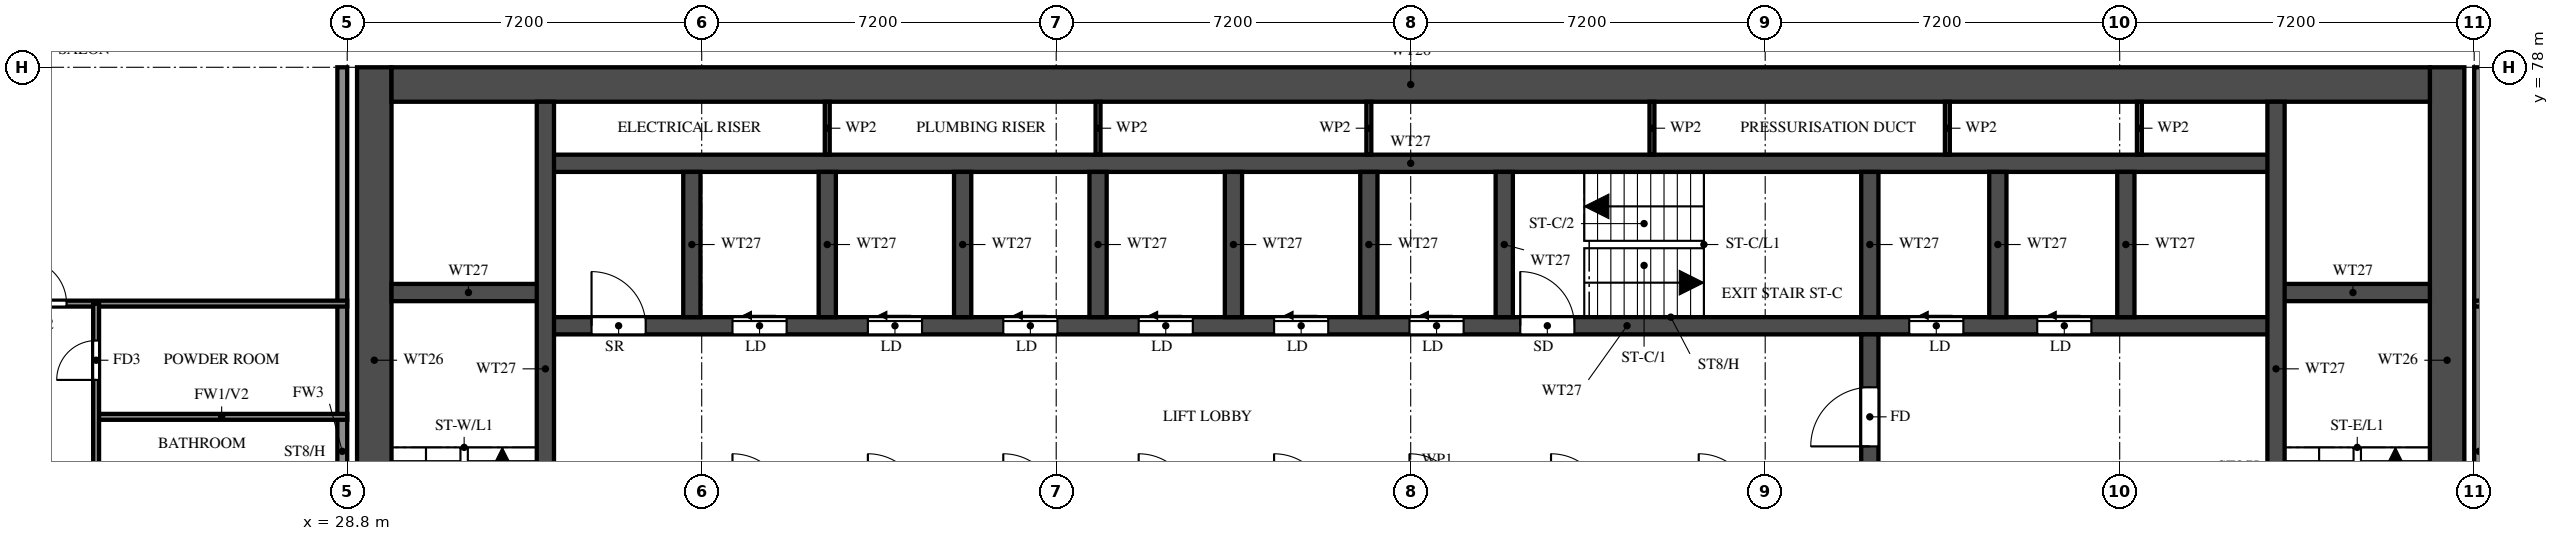
"""IFC4 building model, lengths in metres.
Left out: names, types, materials, properties, quantities, classifications, styles, units other than length and angle.
Written with IfcOpenShell. Run it as: python <this file> out.ifc"""

import sys

from ifc_helpers import new_model, si_unit, direction, frame, frame_2d, origin, place, context, subcontext, project, spatial, rectangle, extrude, element, fill, save


model = new_model("IFC4")
c1 = context("Model", 3, precision=1e-05, world=origin(), true_north=direction((0.0, 1.0)))
c2 = subcontext(c1, "Body", "Model", "MODEL_VIEW")
j1 = project(units=[si_unit("LENGTHUNIT", "METRE"), si_unit("PLANEANGLEUNIT", "RADIAN")], contexts=[c1])
p1 = place(None, origin())
s1 = spatial("IfcSite", under=j1, at=p1, CompositionType="ELEMENT")
p2 = place(p1, origin())
s2 = spatial("IfcBuilding", under=s1, at=p2, CompositionType="ELEMENT")
p3 = place(p2, frame((0.0, 0.0, 160.5)))
s3 = spatial("IfcBuildingStorey", under=s2, at=p3, CompositionType="ELEMENT", Elevation=160.5)
for number, where, z_axis, x_axis in (
    (1, (29.35, 66.1, 0.0), (0.0, 0.0, 1.0), (0.0, 1.0, 0.0)),
    (2, (71.45, 66.1, 0.0), (0.0, 0.0, 1.0), (0.0, 1.0, 0.0)),
):
    element("IfcWall", number, at=place(p3, frame(where, z_axis=z_axis, x_axis=x_axis)), inside=s3, PredefinedType="SHEAR", context=c2, shape_type="SweptSolid", body=[
        extrude(rectangle(XDim=11.9, YDim=0.7, at=frame_2d((5.95, 0.0))), origin(), (0.0, 0.0, 1.0), 3.2),
    ])
p4 = place(p3, frame((29.7, 77.65, 0.0), z_axis=(0.0, 0.0, 1.0), x_axis=(1.0, 0.0, 0.0)))
e3 = element("IfcWall", 3, at=p4, inside=s3, PredefinedType="SHEAR", context=c2, shape_type="SweptSolid", body=[
    extrude(rectangle(XDim=41.4, YDim=0.7, at=frame_2d((20.7, 0.0))), origin(), (0.0, 0.0, 1.0), 3.2),
])
p5 = place(p3, frame((32.825, 72.75, 0.0), z_axis=(0.0, 0.0, 1.0), x_axis=(1.0, 0.0, 0.0)))
e4 = element("IfcWall", 4, at=p5, inside=s3, PredefinedType="SHEAR", context=c2, shape_type="SweptSolid", body=[
    extrude(rectangle(XDim=35.15, YDim=0.35, at=frame_2d((17.575, 0.0))), origin(), (0.0, 0.0, 1.0), 3.2),
])
p6 = place(p5, frame((19.8, 0.0, 0.0)))
e5 = element("IfcOpeningElement", 5, at=p6, cuts=e4, PredefinedType="OPENING", context=c2, shape_type="SweptSolid", body=[
    extrude(rectangle(XDim=1.1, YDim=2.1, at=frame_2d((0.55, 1.05))), frame((0.0, 0.185, 0.0), z_axis=(0.0, -1.0, 0.0), x_axis=(1.0, 0.0, 0.0)), (0.0, 0.0, 1.0), 0.37),
])
p7 = place(p5, frame((27.7, 0.0, 0.0)))
e6 = element("IfcOpeningElement", 6, at=p7, cuts=e4, PredefinedType="OPENING", context=c2, shape_type="SweptSolid", body=[
    extrude(rectangle(XDim=1.1, YDim=2.1, at=frame_2d((0.55, 1.05))), frame((0.0, 0.185, 0.0), z_axis=(0.0, -1.0, 0.0), x_axis=(1.0, 0.0, 0.0)), (0.0, 0.0, 1.0), 0.37),
])
p8 = place(p5, frame((30.3, 0.0, 0.0)))
e7 = element("IfcOpeningElement", 7, at=p8, cuts=e4, PredefinedType="OPENING", context=c2, shape_type="SweptSolid", body=[
    extrude(rectangle(XDim=1.1, YDim=2.1, at=frame_2d((0.55, 1.05))), frame((0.0, 0.185, 0.0), z_axis=(0.0, -1.0, 0.0), x_axis=(1.0, 0.0, 0.0)), (0.0, 0.0, 1.0), 0.37),
])
p9 = place(p5, frame((3.8, 0.0, 0.0)))
e8 = element("IfcOpeningElement", 8, at=p9, cuts=e4, PredefinedType="OPENING", context=c2, shape_type="SweptSolid", body=[
    extrude(rectangle(XDim=1.1, YDim=2.1, at=frame_2d((0.55, 1.05))), frame((0.0, 0.185, 0.0), z_axis=(0.0, -1.0, 0.0), x_axis=(1.0, 0.0, 0.0)), (0.0, 0.0, 1.0), 0.37),
])
p10 = place(p5, frame((6.55, 0.0, 0.0)))
e9 = element("IfcOpeningElement", 9, at=p10, cuts=e4, PredefinedType="OPENING", context=c2, shape_type="SweptSolid", body=[
    extrude(rectangle(XDim=1.1, YDim=2.1, at=frame_2d((0.55, 1.05))), frame((0.0, 0.185, 0.0), z_axis=(0.0, -1.0, 0.0), x_axis=(1.0, 0.0, 0.0)), (0.0, 0.0, 1.0), 0.37),
])
p11 = place(p5, frame((9.3, 0.0, 0.0)))
e10 = element("IfcOpeningElement", 10, at=p11, cuts=e4, PredefinedType="OPENING", context=c2, shape_type="SweptSolid", body=[
    extrude(rectangle(XDim=1.1, YDim=2.1, at=frame_2d((0.55, 1.05))), frame((0.0, 0.185, 0.0), z_axis=(0.0, -1.0, 0.0), x_axis=(1.0, 0.0, 0.0)), (0.0, 0.0, 1.0), 0.37),
])
p12 = place(p5, frame((12.05, 0.0, 0.0)))
e11 = element("IfcOpeningElement", 11, at=p12, cuts=e4, PredefinedType="OPENING", context=c2, shape_type="SweptSolid", body=[
    extrude(rectangle(XDim=1.1, YDim=2.1, at=frame_2d((0.55, 1.05))), frame((0.0, 0.185, 0.0), z_axis=(0.0, -1.0, 0.0), x_axis=(1.0, 0.0, 0.0)), (0.0, 0.0, 1.0), 0.37),
])
p13 = place(p5, frame((14.8, 0.0, 0.0)))
e12 = element("IfcOpeningElement", 12, at=p13, cuts=e4, PredefinedType="OPENING", context=c2, shape_type="SweptSolid", body=[
    extrude(rectangle(XDim=1.1, YDim=2.1, at=frame_2d((0.55, 1.05))), frame((0.0, 0.185, 0.0), z_axis=(0.0, -1.0, 0.0), x_axis=(1.0, 0.0, 0.0)), (0.0, 0.0, 1.0), 0.37),
])
p14 = place(p5, frame((17.55, 0.0, 0.0)))
e13 = element("IfcOpeningElement", 13, at=p14, cuts=e4, PredefinedType="OPENING", context=c2, shape_type="SweptSolid", body=[
    extrude(rectangle(XDim=1.1, YDim=2.1, at=frame_2d((0.55, 1.05))), frame((0.0, 0.185, 0.0), z_axis=(0.0, -1.0, 0.0), x_axis=(1.0, 0.0, 0.0)), (0.0, 0.0, 1.0), 0.37),
])
p15 = place(p5, frame((0.938, 0.0, 0.0)))
e14 = element("IfcOpeningElement", 14, at=p15, cuts=e4, PredefinedType="OPENING", context=c2, shape_type="SweptSolid", body=[
    extrude(rectangle(XDim=1.1, YDim=2.1, at=frame_2d((0.55, 1.05))), frame((0.0, 0.185, 0.0), z_axis=(0.0, -1.0, 0.0), x_axis=(1.0, 0.0, 0.0)), (0.0, 0.0, 1.0), 0.37),
])
p16 = place(p3, frame((32.825, 76.05, 0.0), z_axis=(0.0, 0.0, 1.0), x_axis=(1.0, 0.0, 0.0)))
e15 = element("IfcWall", 15, at=p16, inside=s3, PredefinedType="SHEAR", context=c2, shape_type="SweptSolid", body=[
    extrude(rectangle(XDim=35.15, YDim=0.35, at=frame_2d((17.575, 0.0))), origin(), (0.0, 0.0, 1.0), 3.2),
])
for number, where, z_axis, x_axis in (
    (16, (29.7, 73.425, 0.0), (0.0, 0.0, 1.0), (1.0, 0.0, 0.0)),
    (17, (67.975, 73.425, 0.0), (0.0, 0.0, 1.0), (1.0, 0.0, 0.0)),
):
    element("IfcWall", number, at=place(p3, frame(where, z_axis=z_axis, x_axis=x_axis)), inside=s3, PredefinedType="SHEAR", context=c2, shape_type="SweptSolid", body=[
        extrude(rectangle(XDim=3.125, YDim=0.35, at=frame_2d((1.562, 0.0))), origin(), (0.0, 0.0, 1.0), 3.2),
    ])
p17 = place(p3, frame((32.825, 66.45, 0.0), z_axis=(0.0, 0.0, 1.0), x_axis=(0.0, 1.0, 0.0)))
e18 = element("IfcWall", 18, at=p17, inside=s3, PredefinedType="SHEAR", context=c2, shape_type="SweptSolid", body=[
    extrude(rectangle(XDim=10.85, YDim=0.35, at=frame_2d((5.425, 0.0))), origin(), (0.0, 0.0, 1.0), 3.2),
])
p18 = place(p3, frame((67.975, 66.45, 0.0), z_axis=(0.0, 0.0, 1.0), x_axis=(0.0, 1.0, 0.0)))
e19 = element("IfcWall", 19, at=p18, inside=s3, PredefinedType="SHEAR", context=c2, shape_type="SweptSolid", body=[
    extrude(rectangle(XDim=10.85, YDim=0.35, at=frame_2d((5.425, 0.0))), origin(), (0.0, 0.0, 1.0), 3.2),
])
p19 = place(p18, frame((0.15, 0.0, 0.0)))
e20 = element("IfcOpeningElement", 20, at=p19, cuts=e19, PredefinedType="OPENING", context=c2, shape_type="SweptSolid", body=[
    extrude(rectangle(XDim=1.1, YDim=2.1, at=frame_2d((0.55, 1.05))), frame((0.0, 0.185, 0.0), z_axis=(0.0, -1.0, 0.0), x_axis=(1.0, 0.0, 0.0)), (0.0, 0.0, 1.0), 0.37),
])
p20 = place(p3, frame((59.725, 66.45, 0.0), z_axis=(0.0, 0.0, 1.0), x_axis=(0.0, 1.0, 0.0)))
e21 = element("IfcWall", 21, at=p20, inside=s3, PredefinedType="SHEAR", context=c2, shape_type="SweptSolid", body=[
    extrude(rectangle(XDim=6.125, YDim=0.35, at=frame_2d((3.062, 0.0))), origin(), (0.0, 0.0, 1.0), 3.2),
])
p21 = place(p20, frame((3.85, 0.0, 0.0)))
e22 = element("IfcOpeningElement", 22, at=p21, cuts=e21, PredefinedType="OPENING", context=c2, shape_type="SweptSolid", body=[
    extrude(rectangle(XDim=1.2, YDim=2.1, at=frame_2d((0.6, 1.05))), frame((0.0, 0.185, 0.0), z_axis=(0.0, -1.0, 0.0), x_axis=(1.0, 0.0, 0.0)), (0.0, 0.0, 1.0), 0.37),
])
for number, where, z_axis, x_axis in (
    (23, (59.725, 72.925, 0.0), (0.0, 0.0, 1.0), (0.0, 1.0, 0.0)),
    (24, (35.8, 72.925, 0.0), (0.0, 0.0, 1.0), (0.0, 1.0, 0.0)),
    (25, (38.55, 72.925, 0.0), (0.0, 0.0, 1.0), (0.0, 1.0, 0.0)),
    (26, (41.3, 72.925, 0.0), (0.0, 0.0, 1.0), (0.0, 1.0, 0.0)),
    (27, (44.05, 72.925, 0.0), (0.0, 0.0, 1.0), (0.0, 1.0, 0.0)),
    (28, (46.8, 72.925, 0.0), (0.0, 0.0, 1.0), (0.0, 1.0, 0.0)),
    (29, (49.55, 72.925, 0.0), (0.0, 0.0, 1.0), (0.0, 1.0, 0.0)),
    (30, (52.3, 72.925, 0.0), (0.0, 0.0, 1.0), (0.0, 1.0, 0.0)),
    (31, (62.325, 72.925, 0.0), (0.0, 0.0, 1.0), (0.0, 1.0, 0.0)),
    (32, (64.925, 72.925, 0.0), (0.0, 0.0, 1.0), (0.0, 1.0, 0.0)),
):
    element("IfcWall", number, at=place(p3, frame(where, z_axis=z_axis, x_axis=x_axis)), inside=s3, PredefinedType="SHEAR", context=c2, shape_type="SweptSolid", body=[
        extrude(rectangle(XDim=2.95, YDim=0.35, at=frame_2d((1.475, 0.0))), origin(), (0.0, 0.0, 1.0), 3.2),
    ])
for number, where, z_axis, x_axis in (
    (33, (38.55, 76.225, 0.0), (0.0, 0.0, 1.0), (0.0, 1.0, 0.0)),
    (34, (44.05, 76.225, 0.0), (0.0, 0.0, 1.0), (0.0, 1.0, 0.0)),
    (35, (49.55, 76.225, 0.0), (0.0, 0.0, 1.0), (0.0, 1.0, 0.0)),
    (36, (55.3, 76.225, 0.0), (0.0, 0.0, 1.0), (0.0, 1.0, 0.0)),
    (37, (61.3, 76.225, 0.0), (0.0, 0.0, 1.0), (0.0, 1.0, 0.0)),
    (38, (65.2, 76.225, 0.0), (0.0, 0.0, 1.0), (0.0, 1.0, 0.0)),
):
    element("IfcWall", number, at=place(p3, frame(where, z_axis=z_axis, x_axis=x_axis)), inside=s3, PredefinedType="PARTITIONING", context=c2, shape_type="SweptSolid", body=[
        extrude(rectangle(XDim=1.075, YDim=0.1, at=frame_2d((0.538, 0.0))), origin(), (0.0, 0.0, 1.0), 3.2),
    ])
for number, where, z_axis, x_axis in (
    (39, (28.7, 62.4, 0.0), (0.0, 0.0, 1.0), (0.0, 1.0, 0.0)),
    (40, (72.1, 62.4, 0.0), (0.0, 0.0, 1.0), (0.0, 1.0, 0.0)),
):
    element("IfcWall", number, at=place(p3, frame(where, z_axis=z_axis, x_axis=x_axis)), inside=s3, PredefinedType="SOLIDWALL", context=c2, shape_type="SweptSolid", body=[
        extrude(rectangle(XDim=15.6, YDim=0.2, at=frame_2d((7.8, 0.0))), origin(), (0.0, 0.0, 1.0), 3.2),
    ])
p22 = place(p3, frame((23.7, 70.9, 0.0), z_axis=(0.0, 0.0, 1.0), x_axis=(1.0, 0.0, 0.0)))
e41 = element("IfcWall", 41, at=p22, inside=s3, PredefinedType="PARTITIONING", context=c2, shape_type="SweptSolid", body=[
    extrude(rectangle(XDim=5.1, YDim=0.12, at=frame_2d((2.55, 0.0))), origin(), (0.0, 0.0, 1.0), 3.2),
])
p23 = place(p3, frame((14.525, 73.2, 0.0), z_axis=(0.0, 0.0, 1.0), x_axis=(1.0, 0.0, 0.0)))
e42 = element("IfcWall", 42, at=p23, inside=s3, PredefinedType="PARTITIONING", context=c2, shape_type="SweptSolid", body=[
    extrude(rectangle(XDim=14.275, YDim=0.12, at=frame_2d((7.138, 0.0))), origin(), (0.0, 0.0, 1.0), 2.3),
])
p24 = place(p23, frame((7.675, 0.0, 0.0)))
e43 = element("IfcOpeningElement", 43, at=p24, cuts=e42, PredefinedType="OPENING", context=c2, shape_type="SweptSolid", body=[
    extrude(rectangle(XDim=0.9, YDim=2.1, at=frame_2d((0.45, 1.05))), frame((0.0, 0.07, 0.0), z_axis=(0.0, -1.0, 0.0), x_axis=(1.0, 0.0, 0.0)), (0.0, 0.0, 1.0), 0.14),
])
p25 = place(p3, frame((72.0, 73.2, 0.0), z_axis=(0.0, 0.0, 1.0), x_axis=(1.0, 0.0, 0.0)))
e44 = element("IfcWall", 44, at=p25, inside=s3, PredefinedType="PARTITIONING", context=c2, shape_type="SweptSolid", body=[
    extrude(rectangle(XDim=14.275, YDim=0.12, at=frame_2d((7.137, 0.0))), origin(), (0.0, 0.0, 1.0), 2.3),
])
p26 = place(p25, frame((5.7, 0.0, 0.0)))
e45 = element("IfcOpeningElement", 45, at=p26, cuts=e44, PredefinedType="OPENING", context=c2, shape_type="SweptSolid", body=[
    extrude(rectangle(XDim=0.9, YDim=2.1, at=frame_2d((0.45, 1.05))), frame((0.0, 0.07, 0.0), z_axis=(0.0, -1.0, 0.0), x_axis=(1.0, 0.0, 0.0)), (0.0, 0.0, 1.0), 0.14),
])
p27 = place(p3, frame((23.7, 61.2, 0.0), z_axis=(0.0, 0.0, 1.0), x_axis=(0.0, 1.0, 0.0)))
e46 = element("IfcWall", 46, at=p27, inside=s3, PredefinedType="PARTITIONING", context=c2, shape_type="SweptSolid", body=[
    extrude(rectangle(XDim=12.0, YDim=0.12, at=frame_2d((6.0, 0.0))), origin(), (0.0, 0.0, 1.0), 3.2),
])
p28 = place(p27, frame((4.2, 0.0, 0.0)))
e47 = element("IfcOpeningElement", 47, at=p28, cuts=e46, PredefinedType="OPENING", context=c2, shape_type="SweptSolid", body=[
    extrude(rectangle(XDim=0.9, YDim=2.1, at=frame_2d((0.45, 1.05))), frame((0.0, 0.07, 0.0), z_axis=(0.0, -1.0, 0.0), x_axis=(1.0, 0.0, 0.0)), (0.0, 0.0, 1.0), 0.14),
])
p29 = place(p27, frame((7.975, 0.0, 0.0)))
e48 = element("IfcOpeningElement", 48, at=p29, cuts=e46, PredefinedType="OPENING", context=c2, shape_type="SweptSolid", body=[
    extrude(rectangle(XDim=0.8, YDim=2.1, at=frame_2d((0.4, 1.05))), frame((0.0, 0.07, 0.0), z_axis=(0.0, -1.0, 0.0), x_axis=(1.0, 0.0, 0.0)), (0.0, 0.0, 1.0), 0.14),
])
p30 = place(p27, frame((10.45, 0.0, 0.0)))
e49 = element("IfcOpeningElement", 49, at=p30, cuts=e46, PredefinedType="OPENING", context=c2, shape_type="SweptSolid", body=[
    extrude(rectangle(XDim=0.8, YDim=2.1, at=frame_2d((0.4, 1.05))), frame((0.0, 0.07, 0.0), z_axis=(0.0, -1.0, 0.0), x_axis=(1.0, 0.0, 0.0)), (0.0, 0.0, 1.0), 0.14),
])
p31 = place(p6, origin())
e50 = element("IfcDoor", 50, at=p31, inside=s3, OperationType="SINGLE_SWING_LEFT", PredefinedType="DOOR", context=c2, shape_type="SweptSolid", body=[
    extrude(rectangle(XDim=1.1, YDim=2.1, at=frame_2d((0.55, 1.05))), frame((0.0, 0.025, 0.0), z_axis=(0.0, -1.0, 0.0), x_axis=(1.0, 0.0, 0.0)), (0.0, 0.0, 1.0), 0.05),
])
fill(e5, e50)
p32 = place(p21, origin())
e51 = element("IfcDoor", 51, at=p32, inside=s3, OperationType="SINGLE_SWING_LEFT", PredefinedType="DOOR", context=c2, shape_type="SweptSolid", body=[
    extrude(rectangle(XDim=1.2, YDim=2.1, at=frame_2d((0.6, 1.05))), frame((0.0, 0.025, 0.0), z_axis=(0.0, -1.0, 0.0), x_axis=(1.0, 0.0, 0.0)), (0.0, 0.0, 1.0), 0.05),
])
fill(e22, e51)
p33 = place(p7, origin())
e52 = element("IfcDoor", 52, at=p33, inside=s3, OperationType="SLIDING_TO_LEFT", PredefinedType="DOOR", context=c2, shape_type="SweptSolid", body=[
    extrude(rectangle(XDim=1.1, YDim=2.1, at=frame_2d((0.55, 1.05))), frame((0.0, 0.025, 0.0), z_axis=(0.0, -1.0, 0.0), x_axis=(1.0, 0.0, 0.0)), (0.0, 0.0, 1.0), 0.05),
])
fill(e6, e52)
p34 = place(p8, origin())
e53 = element("IfcDoor", 53, at=p34, inside=s3, OperationType="SLIDING_TO_LEFT", PredefinedType="DOOR", context=c2, shape_type="SweptSolid", body=[
    extrude(rectangle(XDim=1.1, YDim=2.1, at=frame_2d((0.55, 1.05))), frame((0.0, 0.025, 0.0), z_axis=(0.0, -1.0, 0.0), x_axis=(1.0, 0.0, 0.0)), (0.0, 0.0, 1.0), 0.05),
])
fill(e7, e53)
p35 = place(p9, origin())
e54 = element("IfcDoor", 54, at=p35, inside=s3, OperationType="SLIDING_TO_LEFT", PredefinedType="DOOR", context=c2, shape_type="SweptSolid", body=[
    extrude(rectangle(XDim=1.1, YDim=2.1, at=frame_2d((0.55, 1.05))), frame((0.0, 0.025, 0.0), z_axis=(0.0, -1.0, 0.0), x_axis=(1.0, 0.0, 0.0)), (0.0, 0.0, 1.0), 0.05),
])
fill(e8, e54)
p36 = place(p10, origin())
e55 = element("IfcDoor", 55, at=p36, inside=s3, OperationType="SLIDING_TO_LEFT", PredefinedType="DOOR", context=c2, shape_type="SweptSolid", body=[
    extrude(rectangle(XDim=1.1, YDim=2.1, at=frame_2d((0.55, 1.05))), frame((0.0, 0.025, 0.0), z_axis=(0.0, -1.0, 0.0), x_axis=(1.0, 0.0, 0.0)), (0.0, 0.0, 1.0), 0.05),
])
fill(e9, e55)
p37 = place(p11, origin())
e56 = element("IfcDoor", 56, at=p37, inside=s3, OperationType="SLIDING_TO_LEFT", PredefinedType="DOOR", context=c2, shape_type="SweptSolid", body=[
    extrude(rectangle(XDim=1.1, YDim=2.1, at=frame_2d((0.55, 1.05))), frame((0.0, 0.025, 0.0), z_axis=(0.0, -1.0, 0.0), x_axis=(1.0, 0.0, 0.0)), (0.0, 0.0, 1.0), 0.05),
])
fill(e10, e56)
p38 = place(p12, origin())
e57 = element("IfcDoor", 57, at=p38, inside=s3, OperationType="SLIDING_TO_LEFT", PredefinedType="DOOR", context=c2, shape_type="SweptSolid", body=[
    extrude(rectangle(XDim=1.1, YDim=2.1, at=frame_2d((0.55, 1.05))), frame((0.0, 0.025, 0.0), z_axis=(0.0, -1.0, 0.0), x_axis=(1.0, 0.0, 0.0)), (0.0, 0.0, 1.0), 0.05),
])
fill(e11, e57)
p39 = place(p13, origin())
e58 = element("IfcDoor", 58, at=p39, inside=s3, OperationType="SLIDING_TO_LEFT", PredefinedType="DOOR", context=c2, shape_type="SweptSolid", body=[
    extrude(rectangle(XDim=1.1, YDim=2.1, at=frame_2d((0.55, 1.05))), frame((0.0, 0.025, 0.0), z_axis=(0.0, -1.0, 0.0), x_axis=(1.0, 0.0, 0.0)), (0.0, 0.0, 1.0), 0.05),
])
fill(e12, e58)
p40 = place(p14, origin())
e59 = element("IfcDoor", 59, at=p40, inside=s3, OperationType="SLIDING_TO_LEFT", PredefinedType="DOOR", context=c2, shape_type="SweptSolid", body=[
    extrude(rectangle(XDim=1.1, YDim=2.1, at=frame_2d((0.55, 1.05))), frame((0.0, 0.025, 0.0), z_axis=(0.0, -1.0, 0.0), x_axis=(1.0, 0.0, 0.0)), (0.0, 0.0, 1.0), 0.05),
])
fill(e13, e59)
p41 = place(p15, origin())
e60 = element("IfcDoor", 60, at=p41, inside=s3, OperationType="SINGLE_SWING_LEFT", PredefinedType="DOOR", context=c2, shape_type="SweptSolid", body=[
    extrude(rectangle(XDim=1.1, YDim=2.1, at=frame_2d((0.55, 1.05))), frame((0.0, 0.025, 0.0), z_axis=(0.0, -1.0, 0.0), x_axis=(1.0, 0.0, 0.0)), (0.0, 0.0, 1.0), 0.05),
])
fill(e14, e60)
p42 = place(p24, origin())
e61 = element("IfcDoor", 61, at=p42, inside=s3, OperationType="SINGLE_SWING_LEFT", PredefinedType="DOOR", context=c2, shape_type="SweptSolid", body=[
    extrude(rectangle(XDim=0.9, YDim=2.1, at=frame_2d((0.45, 1.05))), frame((0.0, 0.025, 0.0), z_axis=(0.0, -1.0, 0.0), x_axis=(1.0, 0.0, 0.0)), (0.0, 0.0, 1.0), 0.05),
])
fill(e43, e61)
p43 = place(p30, origin())
e62 = element("IfcDoor", 62, at=p43, inside=s3, OperationType="SINGLE_SWING_LEFT", PredefinedType="DOOR", context=c2, shape_type="SweptSolid", body=[
    extrude(rectangle(XDim=0.8, YDim=2.1, at=frame_2d((0.4, 1.05))), frame((0.0, 0.025, 0.0), z_axis=(0.0, -1.0, 0.0), x_axis=(1.0, 0.0, 0.0)), (0.0, 0.0, 1.0), 0.05),
])
fill(e49, e62)
save(model, sys.argv[1])
